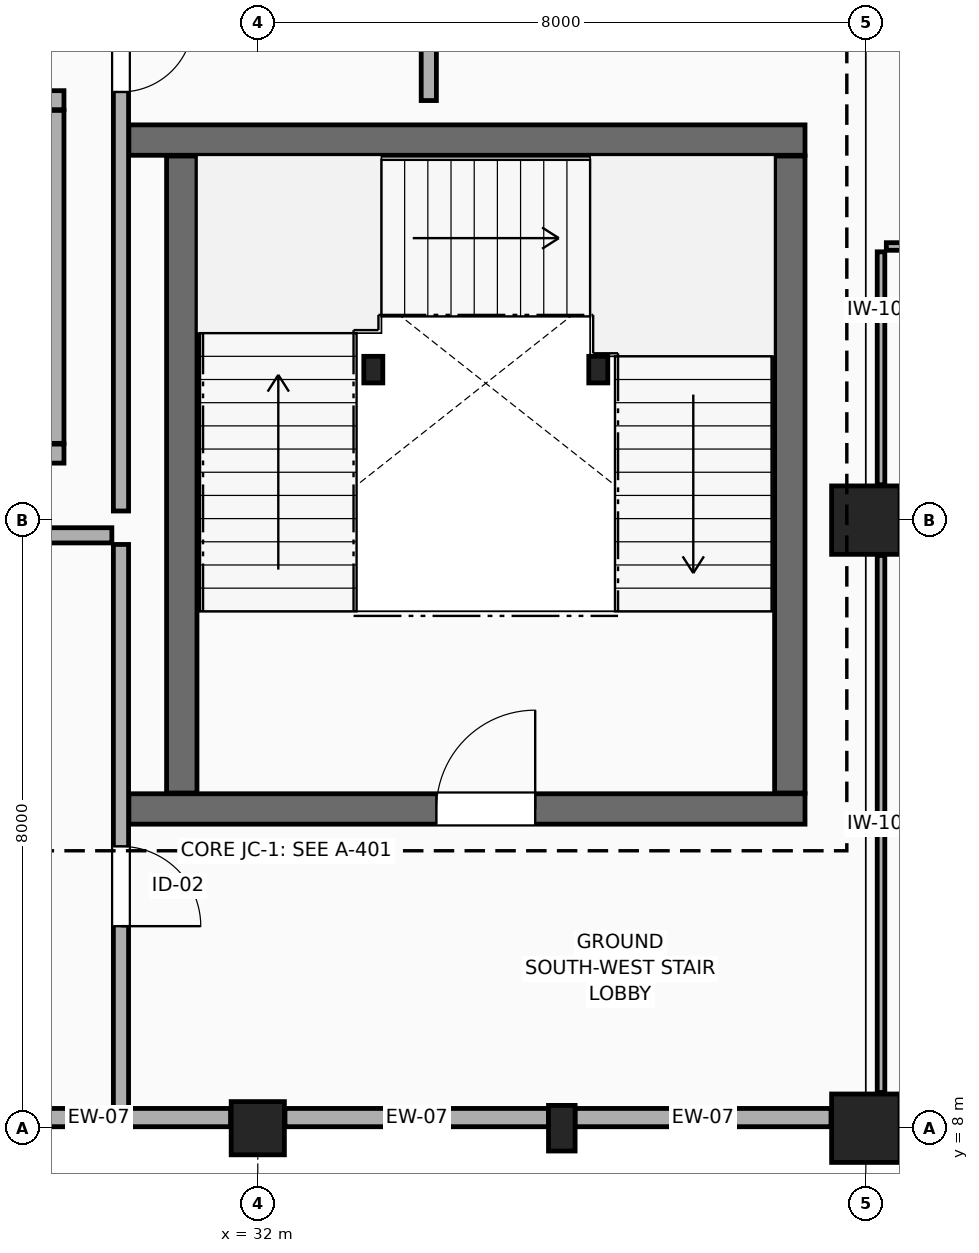
"""IFC4 building model, lengths in metres.
Left out: names, types, materials, properties, quantities, classifications, styles, units other than length and angle.
Written with IfcOpenShell. Run it as: python <this file> out.ifc"""

import sys

from ifc_helpers import new_model, si_unit, direction, frame, frame_2d, origin, origin_2d, place, context, subcontext, project, spatial, rectangle, circle, i_section, extrude, element, fill, save


model = new_model("IFC4")
c1 = context("Model", 3, precision=1e-05, world=origin(), true_north=direction((0.0, 1.0)))
c2 = subcontext(c1, "Body", "Model", "MODEL_VIEW")
j1 = project(units=[si_unit("LENGTHUNIT", "METRE"), si_unit("PLANEANGLEUNIT", "RADIAN")], contexts=[c1])
p1 = place(None, origin())
s1 = spatial("IfcSite", under=j1, at=p1, CompositionType="ELEMENT")
p2 = place(p1, origin())
s2 = spatial("IfcBuilding", under=s1, at=p2, CompositionType="ELEMENT")
p3 = place(p2, origin())
s3 = spatial("IfcBuildingStorey", under=s2, at=p3, CompositionType="ELEMENT", Elevation=0.0)
p4 = place(p3, frame((32.0, 8.0, 0.0), z_axis=(0.0, 0.0, 1.0), x_axis=(1.0, 0.0, 0.0)))
e1 = element("IfcColumn", 1, at=p4, inside=s3, PredefinedType="COLUMN", context=c2, shape_type="SweptSolid", body=[
    extrude(circle(Radius=0.35, at=origin_2d()), origin(), (0.0, 0.0, 1.0), 5.4),
])
for number, where, z_axis, x_axis in (
    (2, (40.0, 8.0, 0.0), (0.0, 0.0, 1.0), (1.0, 0.0, 0.0)),
    (3, (40.0, 16.0, 0.0), (0.0, 0.0, 1.0), (1.0, 0.0, 0.0)),
):
    element("IfcColumn", number, at=place(p3, frame(where, z_axis=z_axis, x_axis=x_axis)), inside=s3, PredefinedType="COLUMN", context=c2, shape_type="SweptSolid", body=[
        extrude(rectangle(XDim=0.9, YDim=0.9, at=origin_2d()), origin(), (0.0, 0.0, 1.0), 5.4),
    ])
for number, where, z_axis, x_axis in (
    (4, (33.52, 17.98, 0.0), (0.0, 0.0, 1.0), (1.0, 0.0, 0.0)),
    (5, (36.48, 17.98, 0.0), (0.0, 0.0, 1.0), (1.0, 0.0, 0.0)),
):
    element("IfcColumn", number, at=place(p3, frame(where, z_axis=z_axis, x_axis=x_axis)), inside=s3, PredefinedType="COLUMN", context=c2, shape_type="SweptSolid", body=[
        extrude(i_section(OverallWidth=0.25, OverallDepth=0.35, WebThickness=0.01, FlangeThickness=0.012, FilletRadius=0.012, at=origin_2d()), origin(), (0.0, 0.0, 1.0), 5.4),
    ])
p5 = place(p3, frame((36.0, 8.0, 0.0), z_axis=(0.0, 0.0, 1.0), x_axis=(1.0, 0.0, 0.0)))
e6 = element("IfcColumn", 6, at=p5, inside=s3, PredefinedType="PILASTER", context=c2, shape_type="SweptSolid", body=[
    extrude(rectangle(XDim=0.35, YDim=0.6, at=origin_2d()), origin(), (0.0, 0.0, 1.0), 5.4),
])
p6 = place(p3, frame((39.542, 8.14, 0.0), z_axis=(0.0, 0.0, 1.0), x_axis=(-1.0, 0.0, 0.0)))
e7 = element("IfcWall", 7, at=p6, inside=s3, PredefinedType="ELEMENTEDWALL", context=c2, shape_type="SweptSolid", body=[
    extrude(rectangle(XDim=3.37, YDim=0.24, at=frame_2d((1.685, 0.0))), origin(), (0.0, 0.0, 1.0), 4.605),
])
p7 = place(p3, frame((35.828, 8.14, 0.0), z_axis=(0.0, 0.0, 1.0), x_axis=(-1.0, 0.0, 0.0)))
e8 = element("IfcWall", 8, at=p7, inside=s3, PredefinedType="ELEMENTEDWALL", context=c2, shape_type="SweptSolid", body=[
    extrude(rectangle(XDim=3.47, YDim=0.24, at=frame_2d((1.735, 0.0))), origin(), (0.0, 0.0, 1.0), 4.605),
])
p8 = place(p3, frame((31.642, 8.14, 0.0), z_axis=(0.0, 0.0, 1.0), x_axis=(-1.0, 0.0, 0.0)))
e9 = element("IfcWall", 9, at=p8, inside=s3, PredefinedType="ELEMENTEDWALL", context=c2, shape_type="SweptSolid", body=[
    extrude(rectangle(XDim=3.47, YDim=0.24, at=frame_2d((1.735, 0.0))), origin(), (0.0, 0.0, 1.0), 4.555),
])
p9 = place(p3, frame((30.304, 12.2, 0.0), z_axis=(0.0, 0.0, 1.0), x_axis=(1.0, 0.0, 0.0)))
e10 = element("IfcWall", 10, at=p9, inside=s3, PredefinedType="SHEAR", context=c2, shape_type="SweptSolid", body=[
    extrude(rectangle(XDim=8.896, YDim=0.4, at=frame_2d((4.448, 0.0))), origin(), (0.0, 0.0, 1.0), 5.12),
])
p10 = place(p9, frame((4.046, 0.0, 0.0)))
e11 = element("IfcOpeningElement", 11, at=p10, cuts=e10, PredefinedType="OPENING", context=c2, shape_type="SweptSolid", body=[
    extrude(rectangle(XDim=1.3, YDim=2.15, at=frame_2d((0.65, 1.075))), frame((0.0, 0.21, 0.0), z_axis=(0.0, -1.0, 0.0), x_axis=(1.0, 0.0, 0.0)), (0.0, 0.0, 1.0), 0.42),
])
p11 = place(p3, frame((39.2, 21.0, 0.0), z_axis=(0.0, 0.0, 1.0), x_axis=(-1.0, 0.0, 0.0)))
e12 = element("IfcWall", 12, at=p11, inside=s3, PredefinedType="SHEAR", context=c2, shape_type="SweptSolid", body=[
    extrude(rectangle(XDim=8.896, YDim=0.4, at=frame_2d((4.448, 0.0))), origin(), (0.0, 0.0, 1.0), 5.12),
])
for number, where, z_axis, x_axis in (
    (13, (39.0, 12.41, 0.0), (0.0, 0.0, 1.0), (0.0, 1.0, 0.0)),
    (14, (31.0, 20.79, 0.0), (0.0, 0.0, 1.0), (0.0, -1.0, 0.0)),
):
    element("IfcWall", number, at=place(p3, frame(where, z_axis=z_axis, x_axis=x_axis)), inside=s3, PredefinedType="SHEAR", context=c2, shape_type="SweptSolid", body=[
        extrude(rectangle(XDim=8.38, YDim=0.4, at=frame_2d((4.19, 0.0))), origin(), (0.0, 0.0, 1.0), 5.12),
    ])
for number, where, z_axis, x_axis in (
    (15, (25.75, 16.875, 0.0), (0.0, 0.0, 1.0), (1.0, 0.0, 0.0)),
    (16, (29.45, 21.525, 0.0), (0.0, 0.0, 1.0), (-1.0, 0.0, 0.0)),
):
    element("IfcWall", number, at=place(p3, frame(where, z_axis=z_axis, x_axis=x_axis)), inside=s3, PredefinedType="STANDARD", context=c2, shape_type="SweptSolid", body=[
        extrude(rectangle(XDim=3.7, YDim=0.25, at=frame_2d((1.85, 0.0))), origin(), (0.0, 0.0, 1.0), 5.11),
    ])
p12 = place(p3, frame((29.325, 17.01, 0.0), z_axis=(0.0, 0.0, 1.0), x_axis=(0.0, 1.0, 0.0)))
e17 = element("IfcWall", 17, at=p12, inside=s3, PredefinedType="STANDARD", context=c2, shape_type="SweptSolid", body=[
    extrude(rectangle(XDim=4.38, YDim=0.25, at=frame_2d((2.19, 0.0))), origin(), (0.0, 0.0, 1.0), 5.11),
])
p13 = place(p3, frame((40.27, 19.6, 0.0), z_axis=(0.0, 0.0, 1.0), x_axis=(1.0, 0.0, 0.0)))
e18 = element("IfcWall", 18, at=p13, inside=s3, PredefinedType="PARTITIONING", context=c2, shape_type="SweptSolid", body=[
    extrude(rectangle(XDim=23.66, YDim=0.1, at=frame_2d((11.83, 0.0))), origin(), (0.0, 0.0, 1.0), 4.3),
])
p14 = place(p13, frame((11.305, 0.0, 0.0)))
e19 = element("IfcOpeningElement", 19, at=p14, cuts=e18, PredefinedType="OPENING", context=c2, shape_type="SweptSolid", body=[
    extrude(rectangle(XDim=1.05, YDim=2.15, at=frame_2d((0.525, 1.075))), frame((0.0, 0.06, 0.0), z_axis=(0.0, -1.0, 0.0), x_axis=(1.0, 0.0, 0.0)), (0.0, 0.0, 1.0), 0.12),
])
p15 = place(p13, frame((7.913, 0.0, 0.0)))
e20 = element("IfcOpeningElement", 20, at=p15, cuts=e18, PredefinedType="OPENING", context=c2, shape_type="SweptSolid", body=[
    extrude(rectangle(XDim=1.05, YDim=2.15, at=frame_2d((0.525, 1.075))), frame((0.0, 0.06, 0.0), z_axis=(0.0, -1.0, 0.0), x_axis=(1.0, 0.0, 0.0)), (0.0, 0.0, 1.0), 0.12),
])
p16 = place(p3, frame((40.2, 8.47, 0.0), z_axis=(0.0, 0.0, 1.0), x_axis=(0.0, 1.0, 0.0)))
e21 = element("IfcWall", 21, at=p16, inside=s3, PredefinedType="PARTITIONING", context=c2, shape_type="SweptSolid", body=[
    extrude(rectangle(XDim=7.065, YDim=0.1, at=frame_2d((3.532, 0.0))), origin(), (0.0, 0.0, 1.0), 4.6),
])
p17 = place(p3, frame((40.2, 16.465, 0.0), z_axis=(0.0, 0.0, 1.0), x_axis=(0.0, 1.0, 0.0)))
e22 = element("IfcWall", 22, at=p17, inside=s3, PredefinedType="PARTITIONING", context=c2, shape_type="SweptSolid", body=[
    extrude(rectangle(XDim=3.065, YDim=0.1, at=frame_2d((1.532, 0.0))), origin(), (0.0, 0.0, 1.0), 4.65),
])
p18 = place(p3, frame((28.94, 15.8, 0.0), z_axis=(0.0, 0.0, 1.0), x_axis=(1.0, 0.0, 0.0)))
e23 = element("IfcWall", 23, at=p18, inside=s3, PredefinedType="PARTITIONING", context=c2, shape_type="SweptSolid", body=[
    extrude(rectangle(XDim=1.14, YDim=0.2, at=frame_2d((0.57, 0.0))), origin(), (0.0, 0.0, 1.0), 5.11),
])
p19 = place(p3, frame((30.2, 15.68, 0.0), z_axis=(0.0, 0.0, 1.0), x_axis=(0.0, -1.0, 0.0)))
e24 = element("IfcWall", 24, at=p19, inside=s3, PredefinedType="PARTITIONING", context=c2, shape_type="SweptSolid", body=[
    extrude(rectangle(XDim=7.416, YDim=0.2, at=frame_2d((3.708, 0.0))), origin(), (0.0, 0.0, 1.0), 5.11),
])
p20 = place(p19, frame((3.972, 0.0, 0.0)))
e25 = element("IfcOpeningElement", 25, at=p20, cuts=e24, PredefinedType="OPENING", context=c2, shape_type="SweptSolid", body=[
    extrude(rectangle(XDim=1.05, YDim=2.15, at=frame_2d((0.525, 1.075))), frame((0.0, 0.11, 0.0), z_axis=(0.0, -1.0, 0.0), x_axis=(1.0, 0.0, 0.0)), (0.0, 0.0, 1.0), 0.22),
])
p21 = place(p3, frame((30.2, 23.48, 0.0), z_axis=(0.0, 0.0, 1.0), x_axis=(0.0, -1.0, 0.0)))
e26 = element("IfcWall", 26, at=p21, inside=s3, PredefinedType="PARTITIONING", context=c2, shape_type="SweptSolid", body=[
    extrude(rectangle(XDim=7.36, YDim=0.2, at=frame_2d((3.68, 0.0))), origin(), (0.0, 0.0, 1.0), 5.11),
])
p22 = place(p21, frame((0.897, 0.0, 0.0)))
e27 = element("IfcOpeningElement", 27, at=p22, cuts=e26, PredefinedType="OPENING", context=c2, shape_type="SweptSolid", body=[
    extrude(rectangle(XDim=0.95, YDim=2.15, at=frame_2d((0.475, 1.075))), frame((0.0, 0.11, 0.0), z_axis=(0.0, -1.0, 0.0), x_axis=(1.0, 0.0, 0.0)), (0.0, 0.0, 1.0), 0.22),
])
p23 = place(p3, frame((34.25, 21.52, 0.0), z_axis=(0.0, 0.0, 1.0), x_axis=(0.0, 1.0, 0.0)))
e28 = element("IfcWall", 28, at=p23, inside=s3, PredefinedType="PARTITIONING", context=c2, shape_type="SweptSolid", body=[
    extrude(rectangle(XDim=12.71, YDim=0.2, at=frame_2d((6.355, 0.0))), origin(), (0.0, 0.0, 1.0), 5.11),
])
p24 = place(p23, frame((5.455, 0.0, 0.0)))
e29 = element("IfcOpeningElement", 29, at=p24, cuts=e28, PredefinedType="OPENING", context=c2, shape_type="SweptSolid", body=[
    extrude(rectangle(XDim=1.8, YDim=2.15, at=frame_2d((0.9, 1.075))), frame((0.0, 0.11, 0.0), z_axis=(0.0, -1.0, 0.0), x_axis=(1.0, 0.0, 0.0)), (0.0, 0.0, 1.0), 0.22),
])
p25 = place(p10, origin())
e30 = element("IfcDoor", 30, at=p25, inside=s3, OperationType="SINGLE_SWING_RIGHT", PredefinedType="DOOR", context=c2, shape_type="SweptSolid", body=[
    extrude(rectangle(XDim=1.3, YDim=2.15, at=frame_2d((0.65, 1.075))), frame((0.0, 0.025, 0.0), z_axis=(0.0, -1.0, 0.0), x_axis=(1.0, 0.0, 0.0)), (0.0, 0.0, 1.0), 0.05),
])
fill(e11, e30)
p26 = place(p20, origin())
e31 = element("IfcDoor", 31, at=p26, inside=s3, OperationType="SINGLE_SWING_RIGHT", PredefinedType="DOOR", context=c2, shape_type="SweptSolid", body=[
    extrude(rectangle(XDim=1.05, YDim=2.15, at=frame_2d((0.525, 1.075))), frame((0.0, 0.025, 0.0), z_axis=(0.0, -1.0, 0.0), x_axis=(1.0, 0.0, 0.0)), (0.0, 0.0, 1.0), 0.05),
])
fill(e25, e31)
p27 = place(p22, origin())
e32 = element("IfcDoor", 32, at=p27, inside=s3, OperationType="SINGLE_SWING_LEFT", PredefinedType="DOOR", context=c2, shape_type="SweptSolid", body=[
    extrude(rectangle(XDim=0.95, YDim=2.15, at=frame_2d((0.475, 1.075))), frame((0.0, 0.025, 0.0), z_axis=(0.0, -1.0, 0.0), x_axis=(1.0, 0.0, 0.0)), (0.0, 0.0, 1.0), 0.05),
])
fill(e27, e32)
save(model, sys.argv[1])
